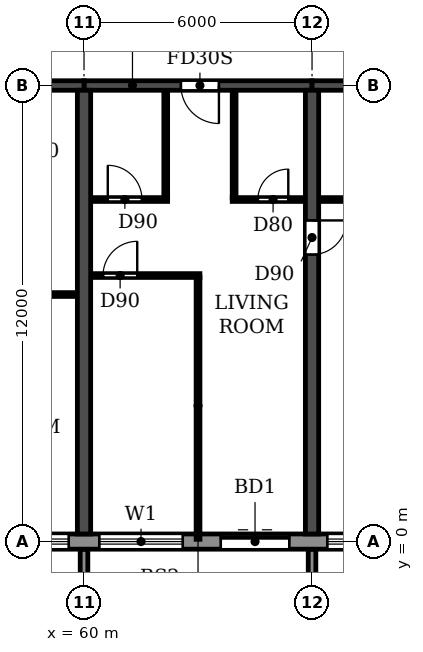
"""IFC4 building model, lengths in metres.
Left out: names, types, materials, properties, quantities, classifications, styles, units other than length and angle.
Written with IfcOpenShell. Run it as: python <this file> out.ifc"""

import sys

from ifc_helpers import new_model, si_unit, direction, frame, frame_2d, origin, place, context, subcontext, project, spatial, polyline, rectangle, outline, extrude, source, transform, mapped, element, fill, save


model = new_model("IFC4")
c1 = context("Model", 3, precision=1e-05, world=origin(), true_north=direction((0.0, 1.0)))
c2 = subcontext(c1, "Body", "Model", "MODEL_VIEW")
j1 = project(units=[si_unit("LENGTHUNIT", "METRE"), si_unit("PLANEANGLEUNIT", "RADIAN")], contexts=[c1])
p1 = place(None, origin())
s1 = spatial("IfcSite", under=j1, at=p1, CompositionType="ELEMENT")
p2 = place(p1, origin())
s2 = spatial("IfcBuilding", under=s1, at=p2, CompositionType="ELEMENT")
p3 = place(p2, frame((0.0, 0.0, 82.8)))
s3 = spatial("IfcBuildingStorey", under=s2, at=p3, CompositionType="ELEMENT", Elevation=82.8)
p4 = place(p3, frame((60.0, 0.2, 0.0), z_axis=(0.0, 0.0, 1.0), x_axis=(0.0, 1.0, 0.0)))
e1 = element("IfcWall", 1, at=p4, inside=s3, PredefinedType="SHEAR", context=c2, shape_type="SweptSolid", body=[
    extrude(rectangle(XDim=11.675, YDim=0.35, at=frame_2d((5.837, 0.0))), origin(), (0.0, 0.0, 1.0), 3.06),
])
p5 = place(p3, frame((66.0, 0.2, 0.0), z_axis=(0.0, 0.0, 1.0), x_axis=(0.0, 1.0, 0.0)))
e2 = element("IfcWall", 2, at=p5, inside=s3, PredefinedType="SHEAR", context=c2, shape_type="SweptSolid", body=[
    extrude(rectangle(XDim=11.675, YDim=0.35, at=frame_2d((5.837, 0.0))), origin(), (0.0, 0.0, 1.0), 3.06),
])
p6 = place(p5, frame((7.35, 0.0, 0.0)))
e3 = element("IfcOpeningElement", 3, at=p6, cuts=e2, PredefinedType="OPENING", context=c2, shape_type="SweptSolid", body=[
    extrude(rectangle(XDim=0.9, YDim=2.1, at=frame_2d((0.45, 1.05))), frame((0.0, 0.185, 0.0), z_axis=(0.0, -1.0, 0.0), x_axis=(1.0, 0.0, 0.0)), (0.0, 0.0, 1.0), 0.37),
])
p7 = place(p3, frame((54.0, 12.0, 0.0), z_axis=(0.0, 0.0, 1.0), x_axis=(1.0, 0.0, 0.0)))
e4 = element("IfcWall", 4, at=p7, inside=s3, PredefinedType="SHEAR", context=c2, shape_type="SweptSolid", body=[
    extrude(rectangle(XDim=6.0, YDim=0.25, at=frame_2d((3.0, 0.0))), origin(), (0.0, 0.0, 1.0), 2.46),
])
p8 = place(p7, frame((2.45, 0.0, 0.0)))
e5 = element("IfcOpeningElement", 5, at=p8, cuts=e4, PredefinedType="OPENING", context=c2, shape_type="SweptSolid", body=[
    extrude(rectangle(XDim=1.0, YDim=2.1, at=frame_2d((0.5, 1.05))), frame((0.0, 0.135, 0.0), z_axis=(0.0, -1.0, 0.0), x_axis=(1.0, 0.0, 0.0)), (0.0, 0.0, 1.0), 0.27),
])
p9 = place(p3, frame((60.0, 12.0, 0.0), z_axis=(0.0, 0.0, 1.0), x_axis=(1.0, 0.0, 0.0)))
e6 = element("IfcWall", 6, at=p9, inside=s3, PredefinedType="SHEAR", context=c2, shape_type="SweptSolid", body=[
    extrude(rectangle(XDim=6.0, YDim=0.25, at=frame_2d((3.0, 0.0))), origin(), (0.0, 0.0, 1.0), 2.46),
])
p10 = place(p9, frame((2.55, 0.0, 0.0)))
e7 = element("IfcOpeningElement", 7, at=p10, cuts=e6, PredefinedType="OPENING", context=c2, shape_type="SweptSolid", body=[
    extrude(rectangle(XDim=1.0, YDim=2.1, at=frame_2d((0.5, 1.05))), frame((0.0, 0.135, 0.0), z_axis=(0.0, -1.0, 0.0), x_axis=(1.0, 0.0, 0.0)), (0.0, 0.0, 1.0), 0.27),
])
p11 = place(p3, frame((66.0, 12.0, 0.0), z_axis=(0.0, 0.0, 1.0), x_axis=(1.0, 0.0, 0.0)))
e8 = element("IfcWall", 8, at=p11, inside=s3, PredefinedType="SHEAR", context=c2, shape_type="SweptSolid", body=[
    extrude(rectangle(XDim=6.0, YDim=0.25, at=frame_2d((3.0, 0.0))), origin(), (0.0, 0.0, 1.0), 2.46),
])
p12 = place(p3, frame((10.683, 0.0, 0.0), z_axis=(0.0, 0.0, 1.0), x_axis=(1.0, 0.0, 0.0)))
e9 = element("IfcWall", 9, at=p12, inside=s3, PredefinedType="STANDARD", context=c2, shape_type="SweptSolid", body=[
    extrude(rectangle(XDim=80.634, YDim=0.4, at=frame_2d((40.317, 0.0))), origin(), (0.0, 0.0, 1.0), 3.06),
])
p13 = place(p12, frame((1.717, 0.0, 0.9)))
e10 = element("IfcOpeningElement", 10, at=p13, cuts=e9, PredefinedType="OPENING", context=c2, shape_type="SweptSolid", body=[
    extrude(rectangle(XDim=2.2, YDim=1.5, at=frame_2d((1.1, 0.75))), frame((0.0, 0.21, 0.0), z_axis=(0.0, -1.0, 0.0), x_axis=(1.0, 0.0, 0.0)), (0.0, 0.0, 1.0), 0.42),
])
p14 = place(p12, frame((4.917, 0.0, 0.0)))
e11 = element("IfcOpeningElement", 11, at=p14, cuts=e9, PredefinedType="OPENING", context=c2, shape_type="SweptSolid", body=[
    extrude(rectangle(XDim=1.8, YDim=2.4, at=frame_2d((0.9, 1.2))), frame((0.0, 0.21, 0.0), z_axis=(0.0, -1.0, 0.0), x_axis=(1.0, 0.0, 0.0)), (0.0, 0.0, 1.0), 0.42),
])
p15 = place(p12, frame((7.717, 0.0, 0.9)))
e12 = element("IfcOpeningElement", 12, at=p15, cuts=e9, PredefinedType="OPENING", context=c2, shape_type="SweptSolid", body=[
    extrude(rectangle(XDim=2.2, YDim=1.5, at=frame_2d((1.1, 0.75))), frame((0.0, 0.21, 0.0), z_axis=(0.0, -1.0, 0.0), x_axis=(1.0, 0.0, 0.0)), (0.0, 0.0, 1.0), 0.42),
])
p16 = place(p12, frame((10.717, 0.0, 0.9)))
e13 = element("IfcOpeningElement", 13, at=p16, cuts=e9, PredefinedType="OPENING", context=c2, shape_type="SweptSolid", body=[
    extrude(rectangle(XDim=2.2, YDim=1.5, at=frame_2d((1.1, 0.75))), frame((0.0, 0.21, 0.0), z_axis=(0.0, -1.0, 0.0), x_axis=(1.0, 0.0, 0.0)), (0.0, 0.0, 1.0), 0.42),
])
p17 = place(p12, frame((13.917, 0.0, 0.0)))
e14 = element("IfcOpeningElement", 14, at=p17, cuts=e9, PredefinedType="OPENING", context=c2, shape_type="SweptSolid", body=[
    extrude(rectangle(XDim=1.8, YDim=2.4, at=frame_2d((0.9, 1.2))), frame((0.0, 0.21, 0.0), z_axis=(0.0, -1.0, 0.0), x_axis=(1.0, 0.0, 0.0)), (0.0, 0.0, 1.0), 0.42),
])
p18 = place(p12, frame((16.717, 0.0, 0.9)))
e15 = element("IfcOpeningElement", 15, at=p18, cuts=e9, PredefinedType="OPENING", context=c2, shape_type="SweptSolid", body=[
    extrude(rectangle(XDim=2.2, YDim=1.5, at=frame_2d((1.1, 0.75))), frame((0.0, 0.21, 0.0), z_axis=(0.0, -1.0, 0.0), x_axis=(1.0, 0.0, 0.0)), (0.0, 0.0, 1.0), 0.42),
])
p19 = place(p12, frame((19.717, 0.0, 0.9)))
e16 = element("IfcOpeningElement", 16, at=p19, cuts=e9, PredefinedType="OPENING", context=c2, shape_type="SweptSolid", body=[
    extrude(rectangle(XDim=2.2, YDim=1.5, at=frame_2d((1.1, 0.75))), frame((0.0, 0.21, 0.0), z_axis=(0.0, -1.0, 0.0), x_axis=(1.0, 0.0, 0.0)), (0.0, 0.0, 1.0), 0.42),
])
p20 = place(p12, frame((22.717, 0.0, 0.9)))
e17 = element("IfcOpeningElement", 17, at=p20, cuts=e9, PredefinedType="OPENING", context=c2, shape_type="SweptSolid", body=[
    extrude(rectangle(XDim=2.2, YDim=1.5, at=frame_2d((1.1, 0.75))), frame((0.0, 0.21, 0.0), z_axis=(0.0, -1.0, 0.0), x_axis=(1.0, 0.0, 0.0)), (0.0, 0.0, 1.0), 0.42),
])
p21 = place(p12, frame((25.917, 0.0, 0.0)))
e18 = element("IfcOpeningElement", 18, at=p21, cuts=e9, PredefinedType="OPENING", context=c2, shape_type="SweptSolid", body=[
    extrude(rectangle(XDim=1.8, YDim=2.4, at=frame_2d((0.9, 1.2))), frame((0.0, 0.21, 0.0), z_axis=(0.0, -1.0, 0.0), x_axis=(1.0, 0.0, 0.0)), (0.0, 0.0, 1.0), 0.42),
])
p22 = place(p12, frame((28.717, 0.0, 0.9)))
e19 = element("IfcOpeningElement", 19, at=p22, cuts=e9, PredefinedType="OPENING", context=c2, shape_type="SweptSolid", body=[
    extrude(rectangle(XDim=2.2, YDim=1.5, at=frame_2d((1.1, 0.75))), frame((0.0, 0.21, 0.0), z_axis=(0.0, -1.0, 0.0), x_axis=(1.0, 0.0, 0.0)), (0.0, 0.0, 1.0), 0.42),
])
p23 = place(p12, frame((31.717, 0.0, 0.9)))
e20 = element("IfcOpeningElement", 20, at=p23, cuts=e9, PredefinedType="OPENING", context=c2, shape_type="SweptSolid", body=[
    extrude(rectangle(XDim=2.2, YDim=1.5, at=frame_2d((1.1, 0.75))), frame((0.0, 0.21, 0.0), z_axis=(0.0, -1.0, 0.0), x_axis=(1.0, 0.0, 0.0)), (0.0, 0.0, 1.0), 0.42),
])
p24 = place(p12, frame((34.717, 0.0, 0.9)))
e21 = element("IfcOpeningElement", 21, at=p24, cuts=e9, PredefinedType="OPENING", context=c2, shape_type="SweptSolid", body=[
    extrude(rectangle(XDim=2.2, YDim=1.5, at=frame_2d((1.1, 0.75))), frame((0.0, 0.21, 0.0), z_axis=(0.0, -1.0, 0.0), x_axis=(1.0, 0.0, 0.0)), (0.0, 0.0, 1.0), 0.42),
])
p25 = place(p12, frame((37.717, 0.0, 0.9)))
e22 = element("IfcOpeningElement", 22, at=p25, cuts=e9, PredefinedType="OPENING", context=c2, shape_type="SweptSolid", body=[
    extrude(rectangle(XDim=2.2, YDim=1.5, at=frame_2d((1.1, 0.75))), frame((0.0, 0.21, 0.0), z_axis=(0.0, -1.0, 0.0), x_axis=(1.0, 0.0, 0.0)), (0.0, 0.0, 1.0), 0.42),
])
p26 = place(p12, frame((40.917, 0.0, 0.0)))
e23 = element("IfcOpeningElement", 23, at=p26, cuts=e9, PredefinedType="OPENING", context=c2, shape_type="SweptSolid", body=[
    extrude(rectangle(XDim=1.8, YDim=2.4, at=frame_2d((0.9, 1.2))), frame((0.0, 0.21, 0.0), z_axis=(0.0, -1.0, 0.0), x_axis=(1.0, 0.0, 0.0)), (0.0, 0.0, 1.0), 0.42),
])
p27 = place(p12, frame((43.717, 0.0, 0.9)))
e24 = element("IfcOpeningElement", 24, at=p27, cuts=e9, PredefinedType="OPENING", context=c2, shape_type="SweptSolid", body=[
    extrude(rectangle(XDim=2.2, YDim=1.5, at=frame_2d((1.1, 0.75))), frame((0.0, 0.21, 0.0), z_axis=(0.0, -1.0, 0.0), x_axis=(1.0, 0.0, 0.0)), (0.0, 0.0, 1.0), 0.42),
])
p28 = place(p12, frame((46.717, 0.0, 0.9)))
e25 = element("IfcOpeningElement", 25, at=p28, cuts=e9, PredefinedType="OPENING", context=c2, shape_type="SweptSolid", body=[
    extrude(rectangle(XDim=2.2, YDim=1.5, at=frame_2d((1.1, 0.75))), frame((0.0, 0.21, 0.0), z_axis=(0.0, -1.0, 0.0), x_axis=(1.0, 0.0, 0.0)), (0.0, 0.0, 1.0), 0.42),
])
p29 = place(p12, frame((49.717, 0.0, 0.9)))
e26 = element("IfcOpeningElement", 26, at=p29, cuts=e9, PredefinedType="OPENING", context=c2, shape_type="SweptSolid", body=[
    extrude(rectangle(XDim=2.2, YDim=1.5, at=frame_2d((1.1, 0.75))), frame((0.0, 0.21, 0.0), z_axis=(0.0, -1.0, 0.0), x_axis=(1.0, 0.0, 0.0)), (0.0, 0.0, 1.0), 0.42),
])
p30 = place(p12, frame((52.917, 0.0, 0.0)))
e27 = element("IfcOpeningElement", 27, at=p30, cuts=e9, PredefinedType="OPENING", context=c2, shape_type="SweptSolid", body=[
    extrude(rectangle(XDim=1.8, YDim=2.4, at=frame_2d((0.9, 1.2))), frame((0.0, 0.21, 0.0), z_axis=(0.0, -1.0, 0.0), x_axis=(1.0, 0.0, 0.0)), (0.0, 0.0, 1.0), 0.42),
])
p31 = place(p12, frame((55.717, 0.0, 0.9)))
e28 = element("IfcOpeningElement", 28, at=p31, cuts=e9, PredefinedType="OPENING", context=c2, shape_type="SweptSolid", body=[
    extrude(rectangle(XDim=2.2, YDim=1.5, at=frame_2d((1.1, 0.75))), frame((0.0, 0.21, 0.0), z_axis=(0.0, -1.0, 0.0), x_axis=(1.0, 0.0, 0.0)), (0.0, 0.0, 1.0), 0.42),
])
p32 = place(p12, frame((58.717, 0.0, 0.9)))
e29 = element("IfcOpeningElement", 29, at=p32, cuts=e9, PredefinedType="OPENING", context=c2, shape_type="SweptSolid", body=[
    extrude(rectangle(XDim=2.2, YDim=1.5, at=frame_2d((1.1, 0.75))), frame((0.0, 0.21, 0.0), z_axis=(0.0, -1.0, 0.0), x_axis=(1.0, 0.0, 0.0)), (0.0, 0.0, 1.0), 0.42),
])
p33 = place(p12, frame((61.717, 0.0, 0.9)))
e30 = element("IfcOpeningElement", 30, at=p33, cuts=e9, PredefinedType="OPENING", context=c2, shape_type="SweptSolid", body=[
    extrude(rectangle(XDim=2.2, YDim=1.5, at=frame_2d((1.1, 0.75))), frame((0.0, 0.21, 0.0), z_axis=(0.0, -1.0, 0.0), x_axis=(1.0, 0.0, 0.0)), (0.0, 0.0, 1.0), 0.42),
])
p34 = place(p12, frame((64.917, 0.0, 0.0)))
e31 = element("IfcOpeningElement", 31, at=p34, cuts=e9, PredefinedType="OPENING", context=c2, shape_type="SweptSolid", body=[
    extrude(rectangle(XDim=1.8, YDim=2.4, at=frame_2d((0.9, 1.2))), frame((0.0, 0.21, 0.0), z_axis=(0.0, -1.0, 0.0), x_axis=(1.0, 0.0, 0.0)), (0.0, 0.0, 1.0), 0.42),
])
p35 = place(p12, frame((67.717, 0.0, 0.9)))
e32 = element("IfcOpeningElement", 32, at=p35, cuts=e9, PredefinedType="OPENING", context=c2, shape_type="SweptSolid", body=[
    extrude(rectangle(XDim=2.2, YDim=1.5, at=frame_2d((1.1, 0.75))), frame((0.0, 0.21, 0.0), z_axis=(0.0, -1.0, 0.0), x_axis=(1.0, 0.0, 0.0)), (0.0, 0.0, 1.0), 0.42),
])
p36 = place(p12, frame((70.717, 0.0, 0.9)))
e33 = element("IfcOpeningElement", 33, at=p36, cuts=e9, PredefinedType="OPENING", context=c2, shape_type="SweptSolid", body=[
    extrude(rectangle(XDim=2.2, YDim=1.5, at=frame_2d((1.1, 0.75))), frame((0.0, 0.21, 0.0), z_axis=(0.0, -1.0, 0.0), x_axis=(1.0, 0.0, 0.0)), (0.0, 0.0, 1.0), 0.42),
])
p37 = place(p12, frame((73.917, 0.0, 0.0)))
e34 = element("IfcOpeningElement", 34, at=p37, cuts=e9, PredefinedType="OPENING", context=c2, shape_type="SweptSolid", body=[
    extrude(rectangle(XDim=1.8, YDim=2.4, at=frame_2d((0.9, 1.2))), frame((0.0, 0.21, 0.0), z_axis=(0.0, -1.0, 0.0), x_axis=(1.0, 0.0, 0.0)), (0.0, 0.0, 1.0), 0.42),
])
p38 = place(p12, frame((76.717, 0.0, 0.9)))
e35 = element("IfcOpeningElement", 35, at=p38, cuts=e9, PredefinedType="OPENING", context=c2, shape_type="SweptSolid", body=[
    extrude(rectangle(XDim=2.2, YDim=1.5, at=frame_2d((1.1, 0.75))), frame((0.0, 0.21, 0.0), z_axis=(0.0, -1.0, 0.0), x_axis=(1.0, 0.0, 0.0)), (0.0, 0.0, 1.0), 0.42),
])
m1 = source(origin(), c2, "Body", "SweptSolid", [
    extrude(outline(polyline([(0.0, 0.0), (0.2, 0.0), (0.2, 1.65), (0.0, 1.65), (0.0, 0.0)])), origin(), (0.0, 0.0, 1.0), 3.1),
])
for number, where in (
    (36, (59.9, -1.85, 0.0)),
    (37, (65.9, -1.85, 0.0)),
):
    element("IfcWall", number, at=place(p3, frame(where)), inside=s3, PredefinedType="STANDARD", context=c2, shape_type="MappedRepresentation", body=[
        mapped(m1, transform((0.0, 0.0, 0.0))),
    ])
p39 = place(p3, frame((57.8, 6.5, 0.0), z_axis=(0.0, 0.0, 1.0), x_axis=(1.0, 0.0, 0.0)))
e38 = element("IfcWall", 38, at=p39, inside=s3, PredefinedType="PARTITIONING", context=c2, shape_type="SweptSolid", body=[
    extrude(rectangle(XDim=2.015, YDim=0.1, at=frame_2d((1.007, 0.0))), origin(), (0.0, 0.0, 1.0), 3.06),
])
p40 = place(p3, frame((60.185, 7.0, 0.0), z_axis=(0.0, 0.0, 1.0), x_axis=(1.0, 0.0, 0.0)))
e39 = element("IfcWall", 39, at=p40, inside=s3, PredefinedType="PARTITIONING", context=c2, shape_type="SweptSolid", body=[
    extrude(rectangle(XDim=2.865, YDim=0.1, at=frame_2d((1.433, 0.0))), origin(), (0.0, 0.0, 1.0), 3.06),
])
p41 = place(p40, frame((0.315, 0.0, 0.0)))
e40 = element("IfcOpeningElement", 40, at=p41, cuts=e39, PredefinedType="OPENING", context=c2, shape_type="SweptSolid", body=[
    extrude(rectangle(XDim=0.9, YDim=2.1, at=frame_2d((0.45, 1.05))), frame((0.0, 0.06, 0.0), z_axis=(0.0, -1.0, 0.0), x_axis=(1.0, 0.0, 0.0)), (0.0, 0.0, 1.0), 0.12),
])
p42 = place(p3, frame((60.185, 9.0, 0.0), z_axis=(0.0, 0.0, 1.0), x_axis=(1.0, 0.0, 0.0)))
e41 = element("IfcWall", 41, at=p42, inside=s3, PredefinedType="PARTITIONING", context=c2, shape_type="SweptSolid", body=[
    extrude(rectangle(XDim=2.015, YDim=0.1, at=frame_2d((1.007, 0.0))), origin(), (0.0, 0.0, 1.0), 3.06),
])
p43 = place(p42, frame((0.44, 0.0, 0.0)))
e42 = element("IfcOpeningElement", 42, at=p43, cuts=e41, PredefinedType="OPENING", context=c2, shape_type="SweptSolid", body=[
    extrude(rectangle(XDim=0.9, YDim=2.1, at=frame_2d((0.45, 1.05))), frame((0.0, 0.06, 0.0), z_axis=(0.0, -1.0, 0.0), x_axis=(1.0, 0.0, 0.0)), (0.0, 0.0, 1.0), 0.12),
])
p44 = place(p3, frame((63.9, 9.0, 0.0), z_axis=(0.0, 0.0, 1.0), x_axis=(1.0, 0.0, 0.0)))
e43 = element("IfcWall", 43, at=p44, inside=s3, PredefinedType="PARTITIONING", context=c2, shape_type="SweptSolid", body=[
    extrude(rectangle(XDim=1.915, YDim=0.1, at=frame_2d((0.958, 0.0))), origin(), (0.0, 0.0, 1.0), 3.06),
])
p45 = place(p44, frame((0.675, 0.0, 0.0)))
e44 = element("IfcOpeningElement", 44, at=p45, cuts=e43, PredefinedType="OPENING", context=c2, shape_type="SweptSolid", body=[
    extrude(rectangle(XDim=0.8, YDim=2.1, at=frame_2d((0.4, 1.05))), frame((0.0, 0.06, 0.0), z_axis=(0.0, -1.0, 0.0), x_axis=(1.0, 0.0, 0.0)), (0.0, 0.0, 1.0), 0.12),
])
p46 = place(p3, frame((66.185, 9.0, 0.0), z_axis=(0.0, 0.0, 1.0), x_axis=(1.0, 0.0, 0.0)))
e45 = element("IfcWall", 45, at=p46, inside=s3, PredefinedType="PARTITIONING", context=c2, shape_type="SweptSolid", body=[
    extrude(rectangle(XDim=2.915, YDim=0.1, at=frame_2d((1.458, 0.0))), origin(), (0.0, 0.0, 1.0), 3.06),
])
p47 = place(p46, frame((0.915, 0.0, 0.0)))
e46 = element("IfcOpeningElement", 46, at=p47, cuts=e45, PredefinedType="OPENING", context=c2, shape_type="SweptSolid", body=[
    extrude(rectangle(XDim=0.8, YDim=2.1, at=frame_2d((0.4, 1.05))), frame((0.0, 0.06, 0.0), z_axis=(0.0, -1.0, 0.0), x_axis=(1.0, 0.0, 0.0)), (0.0, 0.0, 1.0), 0.12),
])
p48 = place(p3, frame((62.15, 9.05, 0.0), z_axis=(0.0, 0.0, 1.0), x_axis=(0.0, 1.0, 0.0)))
e47 = element("IfcWall", 47, at=p48, inside=s3, PredefinedType="PARTITIONING", context=c2, shape_type="SweptSolid", body=[
    extrude(rectangle(XDim=2.815, YDim=0.1, at=frame_2d((1.407, 0.0))), origin(), (0.0, 0.0, 1.0), 3.06),
])
p49 = place(p3, frame((63.0, 0.06, 0.0), z_axis=(0.0, 0.0, 1.0), x_axis=(0.0, 1.0, 0.0)))
e48 = element("IfcWall", 48, at=p49, inside=s3, PredefinedType="PARTITIONING", context=c2, shape_type="SweptSolid", body=[
    extrude(rectangle(XDim=6.89, YDim=0.1, at=frame_2d((3.445, 0.0))), origin(), (0.0, 0.0, 1.0), 3.06),
])
p50 = place(p3, frame((63.95, 9.05, 0.0), z_axis=(0.0, 0.0, 1.0), x_axis=(0.0, 1.0, 0.0)))
e49 = element("IfcWall", 49, at=p50, inside=s3, PredefinedType="PARTITIONING", context=c2, shape_type="SweptSolid", body=[
    extrude(rectangle(XDim=2.815, YDim=0.1, at=frame_2d((1.407, 0.0))), origin(), (0.0, 0.0, 1.0), 3.06),
])
p51 = place(p28, origin())
e50 = element("IfcWindow", 50, at=p51, inside=s3, PartitioningType="DOUBLE_PANEL_HORIZONTAL", PredefinedType="WINDOW", context=c2, shape_type="SweptSolid", body=[
    extrude(rectangle(XDim=2.2, YDim=1.5, at=frame_2d((1.1, 0.75))), frame((0.0, 0.03, 0.0), z_axis=(0.0, -1.0, 0.0), x_axis=(1.0, 0.0, 0.0)), (0.0, 0.0, 1.0), 0.06),
])
fill(e25, e50)
p52 = place(p29, origin())
e51 = element("IfcWindow", 51, at=p52, inside=s3, PartitioningType="DOUBLE_PANEL_HORIZONTAL", PredefinedType="WINDOW", context=c2, shape_type="SweptSolid", body=[
    extrude(rectangle(XDim=2.2, YDim=1.5, at=frame_2d((1.1, 0.75))), frame((0.0, 0.03, 0.0), z_axis=(0.0, -1.0, 0.0), x_axis=(1.0, 0.0, 0.0)), (0.0, 0.0, 1.0), 0.06),
])
fill(e26, e51)
p53 = place(p30, origin())
e52 = element("IfcDoor", 52, at=p53, inside=s3, OperationType="DOUBLE_DOOR_SLIDING", PredefinedType="DOOR", context=c2, shape_type="SweptSolid", body=[
    extrude(rectangle(XDim=1.8, YDim=2.4, at=frame_2d((0.9, 1.2))), frame((0.0, 0.025, 0.0), z_axis=(0.0, -1.0, 0.0), x_axis=(1.0, 0.0, 0.0)), (0.0, 0.0, 1.0), 0.05),
])
fill(e27, e52)
p54 = place(p31, origin())
e53 = element("IfcWindow", 53, at=p54, inside=s3, PartitioningType="DOUBLE_PANEL_HORIZONTAL", PredefinedType="WINDOW", context=c2, shape_type="SweptSolid", body=[
    extrude(rectangle(XDim=2.2, YDim=1.5, at=frame_2d((1.1, 0.75))), frame((0.0, 0.03, 0.0), z_axis=(0.0, -1.0, 0.0), x_axis=(1.0, 0.0, 0.0)), (0.0, 0.0, 1.0), 0.06),
])
fill(e28, e53)
p55 = place(p41, origin())
e54 = element("IfcDoor", 54, at=p55, inside=s3, OperationType="SINGLE_SWING_RIGHT", PredefinedType="DOOR", context=c2, shape_type="SweptSolid", body=[
    extrude(rectangle(XDim=0.9, YDim=2.1, at=frame_2d((0.45, 1.05))), frame((0.0, 0.025, 0.0), z_axis=(0.0, -1.0, 0.0), x_axis=(1.0, 0.0, 0.0)), (0.0, 0.0, 1.0), 0.05),
])
fill(e40, e54)
p56 = place(p43, origin())
e55 = element("IfcDoor", 55, at=p56, inside=s3, OperationType="SINGLE_SWING_LEFT", PredefinedType="DOOR", context=c2, shape_type="SweptSolid", body=[
    extrude(rectangle(XDim=0.9, YDim=2.1, at=frame_2d((0.45, 1.05))), frame((0.0, 0.025, 0.0), z_axis=(0.0, -1.0, 0.0), x_axis=(1.0, 0.0, 0.0)), (0.0, 0.0, 1.0), 0.05),
])
fill(e42, e55)
p57 = place(p10, frame((1.0, 0.0, 0.0), z_axis=(0.0, 0.0, 1.0), x_axis=(-1.0, 0.0, 0.0)))
e56 = element("IfcDoor", 56, at=p57, inside=s3, OperationType="SINGLE_SWING_LEFT", PredefinedType="DOOR", context=c2, shape_type="SweptSolid", body=[
    extrude(rectangle(XDim=1.0, YDim=2.1, at=frame_2d((0.5, 1.05))), frame((0.0, 0.025, 0.0), z_axis=(0.0, -1.0, 0.0), x_axis=(1.0, 0.0, 0.0)), (0.0, 0.0, 1.0), 0.05),
])
fill(e7, e56)
p58 = place(p45, origin())
e57 = element("IfcDoor", 57, at=p58, inside=s3, OperationType="SINGLE_SWING_RIGHT", PredefinedType="DOOR", context=c2, shape_type="SweptSolid", body=[
    extrude(rectangle(XDim=0.8, YDim=2.1, at=frame_2d((0.4, 1.05))), frame((0.0, 0.025, 0.0), z_axis=(0.0, -1.0, 0.0), x_axis=(1.0, 0.0, 0.0)), (0.0, 0.0, 1.0), 0.05),
])
fill(e44, e57)
p59 = place(p6, frame((0.9, 0.0, 0.0), z_axis=(0.0, 0.0, 1.0), x_axis=(-1.0, 0.0, 0.0)))
e58 = element("IfcDoor", 58, at=p59, inside=s3, OperationType="SINGLE_SWING_LEFT", PredefinedType="DOOR", context=c2, shape_type="SweptSolid", body=[
    extrude(rectangle(XDim=0.9, YDim=2.1, at=frame_2d((0.45, 1.05))), frame((0.0, 0.025, 0.0), z_axis=(0.0, -1.0, 0.0), x_axis=(1.0, 0.0, 0.0)), (0.0, 0.0, 1.0), 0.05),
])
fill(e3, e58)
save(model, sys.argv[1])
